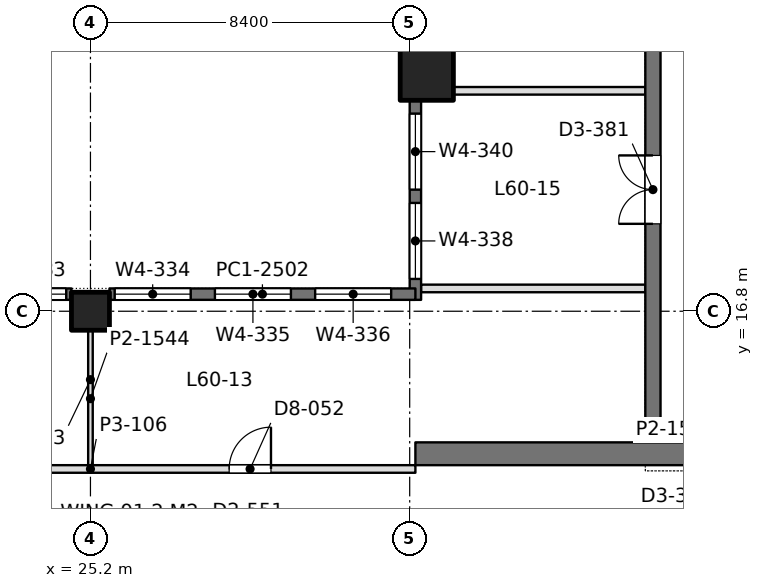
"""IFC4 building model, lengths in metres.
Left out: names, types, materials, properties, quantities, classifications, styles, units other than length and angle.
Written with IfcOpenShell. Run it as: python <this file> out.ifc"""

import sys

from ifc_helpers import new_model, si_unit, direction, frame, frame_2d, origin, origin_2d, place, context, subcontext, project, spatial, rectangle, extrude, element, fill, save


model = new_model("IFC4")
c1 = context("Model", 3, precision=1e-05, world=origin(), true_north=direction((0.0, 1.0)))
c2 = subcontext(c1, "Body", "Model", "MODEL_VIEW")
j1 = project(units=[si_unit("LENGTHUNIT", "METRE"), si_unit("PLANEANGLEUNIT", "RADIAN")], contexts=[c1])
p1 = place(None, origin())
s1 = spatial("IfcSite", under=j1, at=p1, CompositionType="ELEMENT")
p2 = place(p1, origin())
s2 = spatial("IfcBuilding", under=s1, at=p2, CompositionType="ELEMENT")
p3 = place(p2, frame((0.0, 0.0, 263.7)))
s3 = spatial("IfcBuildingStorey", under=s2, at=p3, CompositionType="ELEMENT", Elevation=263.7)
p4 = place(p3, frame((25.2, 16.8, 0.0), z_axis=(0.0, 0.0, 1.0), x_axis=(1.0, 0.0, 0.0)))
e1 = element("IfcColumn", 1, at=p4, inside=s3, PredefinedType="COLUMN", context=c2, shape_type="SweptSolid", body=[
    extrude(rectangle(XDim=1.0, YDim=1.0, at=origin_2d()), origin(), (0.0, 0.0, 1.0), 4.5),
])
p5 = place(p3, frame((34.05, 23.05, 0.0), z_axis=(0.0, 0.0, 1.0), x_axis=(1.0, 0.0, 0.0)))
e2 = element("IfcColumn", 2, at=p5, inside=s3, PredefinedType="COLUMN", context=c2, shape_type="SweptSolid", body=[
    extrude(rectangle(XDim=1.4, YDim=1.4, at=origin_2d()), origin(), (0.0, 0.0, 1.0), 4.5),
])
p6 = place(p3, frame((33.75, 13.05, 0.0), z_axis=(0.0, 0.0, 1.0), x_axis=(1.0, 0.0, 0.0)))
e3 = element("IfcWall", 3, at=p6, inside=s3, PredefinedType="SHEAR", context=c2, shape_type="SweptSolid", body=[
    extrude(rectangle(XDim=17.7, YDim=0.6, at=frame_2d((8.85, 0.0))), origin(), (0.0, 0.0, 1.0), 4.5),
])
p7 = place(p6, frame((7.1, 0.0, 0.0)))
e4 = element("IfcOpeningElement", 4, at=p7, cuts=e3, PredefinedType="OPENING", context=c2, shape_type="SweptSolid", body=[
    extrude(rectangle(XDim=1.8, YDim=2.4, at=frame_2d((0.9, 1.2))), frame((0.0, 0.31, 0.0), z_axis=(0.0, -1.0, 0.0), x_axis=(1.0, 0.0, 0.0)), (0.0, 0.0, 1.0), 0.62),
])
p8 = place(p3, frame((40.0, 13.05, 0.0), z_axis=(0.0, 0.0, 1.0), x_axis=(0.0, 1.0, 0.0)))
e5 = element("IfcWall", 5, at=p8, inside=s3, PredefinedType="SHEAR", context=c2, shape_type="SweptSolid", body=[
    extrude(rectangle(XDim=24.3, YDim=0.4, at=frame_2d((12.15, 0.0))), origin(), (0.0, 0.0, 1.0), 4.5),
])
p9 = place(p8, frame((15.75, 0.0, 0.0)))
e6 = element("IfcOpeningElement", 6, at=p9, cuts=e5, PredefinedType="OPENING", context=c2, shape_type="SweptSolid", body=[
    extrude(rectangle(XDim=1.1, YDim=2.2, at=frame_2d((0.55, 1.1))), frame((0.0, 0.21, 0.0), z_axis=(0.0, -1.0, 0.0), x_axis=(1.0, 0.0, 0.0)), (0.0, 0.0, 1.0), 0.42),
])
p10 = place(p8, frame((18.6, 0.0, 0.0)))
e7 = element("IfcOpeningElement", 7, at=p10, cuts=e5, PredefinedType="OPENING", context=c2, shape_type="SweptSolid", body=[
    extrude(rectangle(XDim=1.1, YDim=2.2, at=frame_2d((0.55, 1.1))), frame((0.0, 0.21, 0.0), z_axis=(0.0, -1.0, 0.0), x_axis=(1.0, 0.0, 0.0)), (0.0, 0.0, 1.0), 0.42),
])
p11 = place(p8, frame((21.45, 0.0, 0.0)))
e8 = element("IfcOpeningElement", 8, at=p11, cuts=e5, PredefinedType="OPENING", context=c2, shape_type="SweptSolid", body=[
    extrude(rectangle(XDim=1.1, YDim=2.2, at=frame_2d((0.55, 1.1))), frame((0.0, 0.21, 0.0), z_axis=(0.0, -1.0, 0.0), x_axis=(1.0, 0.0, 0.0)), (0.0, 0.0, 1.0), 0.42),
])
p12 = place(p8, frame((6.05, 0.0, 0.0)))
e9 = element("IfcOpeningElement", 9, at=p12, cuts=e5, PredefinedType="OPENING", context=c2, shape_type="SweptSolid", body=[
    extrude(rectangle(XDim=1.8, YDim=2.4, at=frame_2d((0.9, 1.2))), frame((0.0, 0.21, 0.0), z_axis=(0.0, -1.0, 0.0), x_axis=(1.0, 0.0, 0.0)), (0.0, 0.0, 1.0), 0.42),
])
p13 = place(p8, frame((11.25, 0.0, 0.0)))
e10 = element("IfcOpeningElement", 10, at=p13, cuts=e5, PredefinedType="OPENING", context=c2, shape_type="SweptSolid", body=[
    extrude(rectangle(XDim=1.8, YDim=2.4, at=frame_2d((0.9, 1.2))), frame((0.0, 0.21, 0.0), z_axis=(0.0, -1.0, 0.0), x_axis=(1.0, 0.0, 0.0)), (0.0, 0.0, 1.0), 0.42),
])
p14 = place(p3, frame((33.75, 17.1, 0.0), z_axis=(0.0, 0.0, 1.0), x_axis=(0.0, 1.0, 0.0)))
e11 = element("IfcWall", 11, at=p14, inside=s3, PredefinedType="SOLIDWALL", context=c2, shape_type="SweptSolid", body=[
    extrude(rectangle(XDim=10.7, YDim=0.3, at=frame_2d((5.35, 0.0))), origin(), (0.0, 0.0, 1.0), 4.35),
])
p15 = place(p14, frame((0.55, 0.0, 0.9)))
e12 = element("IfcOpeningElement", 12, at=p15, cuts=e11, PredefinedType="OPENING", context=c2, shape_type="SweptSolid", body=[
    extrude(rectangle(XDim=2.0, YDim=1.9, at=frame_2d((1.0, 0.95))), frame((0.0, 0.16, 0.0), z_axis=(0.0, -1.0, 0.0), x_axis=(1.0, 0.0, 0.0)), (0.0, 0.0, 1.0), 0.32),
])
p16 = place(p14, frame((2.9, 0.0, 0.9)))
e13 = element("IfcOpeningElement", 13, at=p16, cuts=e11, PredefinedType="OPENING", context=c2, shape_type="SweptSolid", body=[
    extrude(rectangle(XDim=2.0, YDim=1.9, at=frame_2d((1.0, 0.95))), frame((0.0, 0.16, 0.0), z_axis=(0.0, -1.0, 0.0), x_axis=(1.0, 0.0, 0.0)), (0.0, 0.0, 1.0), 0.32),
])
p17 = place(p14, frame((7.675, 0.0, 0.9)))
e14 = element("IfcOpeningElement", 14, at=p17, cuts=e11, PredefinedType="OPENING", context=c2, shape_type="SweptSolid", body=[
    extrude(rectangle(XDim=2.0, YDim=1.9, at=frame_2d((1.0, 0.95))), frame((0.0, 0.16, 0.0), z_axis=(0.0, -1.0, 0.0), x_axis=(1.0, 0.0, 0.0)), (0.0, 0.0, 1.0), 0.32),
])
p18 = place(p3, frame((16.65, 17.25, 0.0), z_axis=(0.0, 0.0, 1.0), x_axis=(1.0, 0.0, 0.0)))
e15 = element("IfcWall", 15, at=p18, inside=s3, PredefinedType="SOLIDWALL", context=c2, shape_type="SweptSolid", body=[
    extrude(rectangle(XDim=8.05, YDim=0.3, at=frame_2d((4.025, 0.0))), origin(), (0.0, 0.0, 1.0), 4.35),
])
p19 = place(p18, frame((0.637, 0.0, 0.9)))
e16 = element("IfcOpeningElement", 16, at=p19, cuts=e15, PredefinedType="OPENING", context=c2, shape_type="SweptSolid", body=[
    extrude(rectangle(XDim=2.0, YDim=1.9, at=frame_2d((1.0, 0.95))), frame((0.0, 0.16, 0.0), z_axis=(0.0, -1.0, 0.0), x_axis=(1.0, 0.0, 0.0)), (0.0, 0.0, 1.0), 0.32),
])
p20 = place(p18, frame((3.275, 0.0, 0.9)))
e17 = element("IfcOpeningElement", 17, at=p20, cuts=e15, PredefinedType="OPENING", context=c2, shape_type="SweptSolid", body=[
    extrude(rectangle(XDim=2.0, YDim=1.9, at=frame_2d((1.0, 0.95))), frame((0.0, 0.16, 0.0), z_axis=(0.0, -1.0, 0.0), x_axis=(1.0, 0.0, 0.0)), (0.0, 0.0, 1.0), 0.32),
])
p21 = place(p18, frame((5.913, 0.0, 0.9)))
e18 = element("IfcOpeningElement", 18, at=p21, cuts=e15, PredefinedType="OPENING", context=c2, shape_type="SweptSolid", body=[
    extrude(rectangle(XDim=2.0, YDim=1.9, at=frame_2d((1.0, 0.95))), frame((0.0, 0.16, 0.0), z_axis=(0.0, -1.0, 0.0), x_axis=(1.0, 0.0, 0.0)), (0.0, 0.0, 1.0), 0.32),
])
p22 = place(p3, frame((25.7, 17.25, 0.0), z_axis=(0.0, 0.0, 1.0), x_axis=(1.0, 0.0, 0.0)))
e19 = element("IfcWall", 19, at=p22, inside=s3, PredefinedType="SOLIDWALL", context=c2, shape_type="SweptSolid", body=[
    extrude(rectangle(XDim=8.05, YDim=0.3, at=frame_2d((4.025, 0.0))), origin(), (0.0, 0.0, 1.0), 4.35),
])
p23 = place(p22, frame((0.137, 0.0, 0.9)))
e20 = element("IfcOpeningElement", 20, at=p23, cuts=e19, PredefinedType="OPENING", context=c2, shape_type="SweptSolid", body=[
    extrude(rectangle(XDim=2.0, YDim=1.9, at=frame_2d((1.0, 0.95))), frame((0.0, 0.16, 0.0), z_axis=(0.0, -1.0, 0.0), x_axis=(1.0, 0.0, 0.0)), (0.0, 0.0, 1.0), 0.32),
])
p24 = place(p22, frame((2.775, 0.0, 0.9)))
e21 = element("IfcOpeningElement", 21, at=p24, cuts=e19, PredefinedType="OPENING", context=c2, shape_type="SweptSolid", body=[
    extrude(rectangle(XDim=2.0, YDim=1.9, at=frame_2d((1.0, 0.95))), frame((0.0, 0.16, 0.0), z_axis=(0.0, -1.0, 0.0), x_axis=(1.0, 0.0, 0.0)), (0.0, 0.0, 1.0), 0.32),
])
p25 = place(p22, frame((5.413, 0.0, 0.9)))
e22 = element("IfcOpeningElement", 22, at=p25, cuts=e19, PredefinedType="OPENING", context=c2, shape_type="SweptSolid", body=[
    extrude(rectangle(XDim=2.0, YDim=1.9, at=frame_2d((1.0, 0.95))), frame((0.0, 0.16, 0.0), z_axis=(0.0, -1.0, 0.0), x_axis=(1.0, 0.0, 0.0)), (0.0, 0.0, 1.0), 0.32),
])
p26 = place(p3, frame((33.898, 17.4, 0.0), z_axis=(0.0, 0.0, 1.0), x_axis=(1.0, 0.0, 0.0)))
e23 = element("IfcWall", 23, at=p26, inside=s3, PredefinedType="PARTITIONING", context=c2, shape_type="SweptSolid", body=[
    extrude(rectangle(XDim=5.904, YDim=0.2, at=frame_2d((2.952, 0.0))), origin(), (0.0, 0.0, 1.0), 3.8),
])
p27 = place(p3, frame((34.749, 22.6, 0.0), z_axis=(0.0, 0.0, 1.0), x_axis=(1.0, 0.0, 0.0)))
e24 = element("IfcWall", 24, at=p27, inside=s3, PredefinedType="PARTITIONING", context=c2, shape_type="SweptSolid", body=[
    extrude(rectangle(XDim=5.053, YDim=0.2, at=frame_2d((2.526, 0.0))), origin(), (0.0, 0.0, 1.0), 4.35),
])
p28 = place(p3, frame((25.2, 12.698, 0.0), z_axis=(0.0, 0.0, 1.0), x_axis=(0.0, 1.0, 0.0)))
e25 = element("IfcWall", 25, at=p28, inside=s3, PredefinedType="PARTITIONING", context=c2, shape_type="SweptSolid", body=[
    extrude(rectangle(XDim=3.603, YDim=0.12, at=frame_2d((1.802, 0.0))), origin(), (0.0, 0.0, 1.0), 3.8),
])
p29 = place(p3, frame((16.65, 12.65, 0.0), z_axis=(0.0, 0.0, 1.0), x_axis=(1.0, 0.0, 0.0)))
e26 = element("IfcWall", 26, at=p29, inside=s3, PredefinedType="PARTITIONING", context=c2, shape_type="SweptSolid", body=[
    extrude(rectangle(XDim=17.1, YDim=0.2, at=frame_2d((8.55, 0.0))), origin(), (0.0, 0.0, 1.0), 3.8),
])
p30 = place(p29, frame((3.8, 0.0, 0.0)))
e27 = element("IfcOpeningElement", 27, at=p30, cuts=e26, PredefinedType="OPENING", context=c2, shape_type="SweptSolid", body=[
    extrude(rectangle(XDim=1.1, YDim=2.4, at=frame_2d((0.55, 1.2))), frame((0.0, 0.11, 0.0), z_axis=(0.0, -1.0, 0.0), x_axis=(1.0, 0.0, 0.0)), (0.0, 0.0, 1.0), 0.22),
])
p31 = place(p29, frame((12.2, 0.0, 0.0)))
e28 = element("IfcOpeningElement", 28, at=p31, cuts=e26, PredefinedType="OPENING", context=c2, shape_type="SweptSolid", body=[
    extrude(rectangle(XDim=1.1, YDim=2.4, at=frame_2d((0.55, 1.2))), frame((0.0, 0.11, 0.0), z_axis=(0.0, -1.0, 0.0), x_axis=(1.0, 0.0, 0.0)), (0.0, 0.0, 1.0), 0.22),
])
p32 = place(p15, origin())
e29 = element("IfcWindow", 29, at=p32, inside=s3, PartitioningType="SINGLE_PANEL", PredefinedType="WINDOW", context=c2, shape_type="SweptSolid", body=[
    extrude(rectangle(XDim=2.0, YDim=1.9, at=frame_2d((1.0, 0.95))), frame((0.0, 0.03, 0.0), z_axis=(0.0, -1.0, 0.0), x_axis=(1.0, 0.0, 0.0)), (0.0, 0.0, 1.0), 0.06),
])
fill(e12, e29)
p33 = place(p16, origin())
e30 = element("IfcWindow", 30, at=p33, inside=s3, PartitioningType="SINGLE_PANEL", PredefinedType="WINDOW", context=c2, shape_type="SweptSolid", body=[
    extrude(rectangle(XDim=2.0, YDim=1.9, at=frame_2d((1.0, 0.95))), frame((0.0, 0.03, 0.0), z_axis=(0.0, -1.0, 0.0), x_axis=(1.0, 0.0, 0.0)), (0.0, 0.0, 1.0), 0.06),
])
fill(e13, e30)
p34 = place(p21, origin())
e31 = element("IfcWindow", 31, at=p34, inside=s3, PartitioningType="SINGLE_PANEL", PredefinedType="WINDOW", context=c2, shape_type="SweptSolid", body=[
    extrude(rectangle(XDim=2.0, YDim=1.9, at=frame_2d((1.0, 0.95))), frame((0.0, 0.03, 0.0), z_axis=(0.0, -1.0, 0.0), x_axis=(1.0, 0.0, 0.0)), (0.0, 0.0, 1.0), 0.06),
])
fill(e18, e31)
p35 = place(p23, origin())
e32 = element("IfcWindow", 32, at=p35, inside=s3, PartitioningType="SINGLE_PANEL", PredefinedType="WINDOW", context=c2, shape_type="SweptSolid", body=[
    extrude(rectangle(XDim=2.0, YDim=1.9, at=frame_2d((1.0, 0.95))), frame((0.0, 0.03, 0.0), z_axis=(0.0, -1.0, 0.0), x_axis=(1.0, 0.0, 0.0)), (0.0, 0.0, 1.0), 0.06),
])
fill(e20, e32)
p36 = place(p24, origin())
e33 = element("IfcWindow", 33, at=p36, inside=s3, PartitioningType="SINGLE_PANEL", PredefinedType="WINDOW", context=c2, shape_type="SweptSolid", body=[
    extrude(rectangle(XDim=2.0, YDim=1.9, at=frame_2d((1.0, 0.95))), frame((0.0, 0.03, 0.0), z_axis=(0.0, -1.0, 0.0), x_axis=(1.0, 0.0, 0.0)), (0.0, 0.0, 1.0), 0.06),
])
fill(e21, e33)
p37 = place(p25, origin())
e34 = element("IfcWindow", 34, at=p37, inside=s3, PartitioningType="SINGLE_PANEL", PredefinedType="WINDOW", context=c2, shape_type="SweptSolid", body=[
    extrude(rectangle(XDim=2.0, YDim=1.9, at=frame_2d((1.0, 0.95))), frame((0.0, 0.03, 0.0), z_axis=(0.0, -1.0, 0.0), x_axis=(1.0, 0.0, 0.0)), (0.0, 0.0, 1.0), 0.06),
])
fill(e22, e34)
p38 = place(p12, origin())
e35 = element("IfcDoor", 35, at=p38, inside=s3, OperationType="DOUBLE_DOOR_SINGLE_SWING", PredefinedType="DOOR", context=c2, shape_type="SweptSolid", body=[
    extrude(rectangle(XDim=1.8, YDim=2.4, at=frame_2d((0.9, 1.2))), frame((0.0, 0.025, 0.0), z_axis=(0.0, -1.0, 0.0), x_axis=(1.0, 0.0, 0.0)), (0.0, 0.0, 1.0), 0.05),
])
fill(e9, e35)
p39 = place(p31, origin())
e36 = element("IfcDoor", 36, at=p39, inside=s3, OperationType="SINGLE_SWING_RIGHT", PredefinedType="DOOR", context=c2, shape_type="SweptSolid", body=[
    extrude(rectangle(XDim=1.1, YDim=2.4, at=frame_2d((0.55, 1.2))), frame((0.0, 0.025, 0.0), z_axis=(0.0, -1.0, 0.0), x_axis=(1.0, 0.0, 0.0)), (0.0, 0.0, 1.0), 0.05),
])
fill(e28, e36)
save(model, sys.argv[1])
